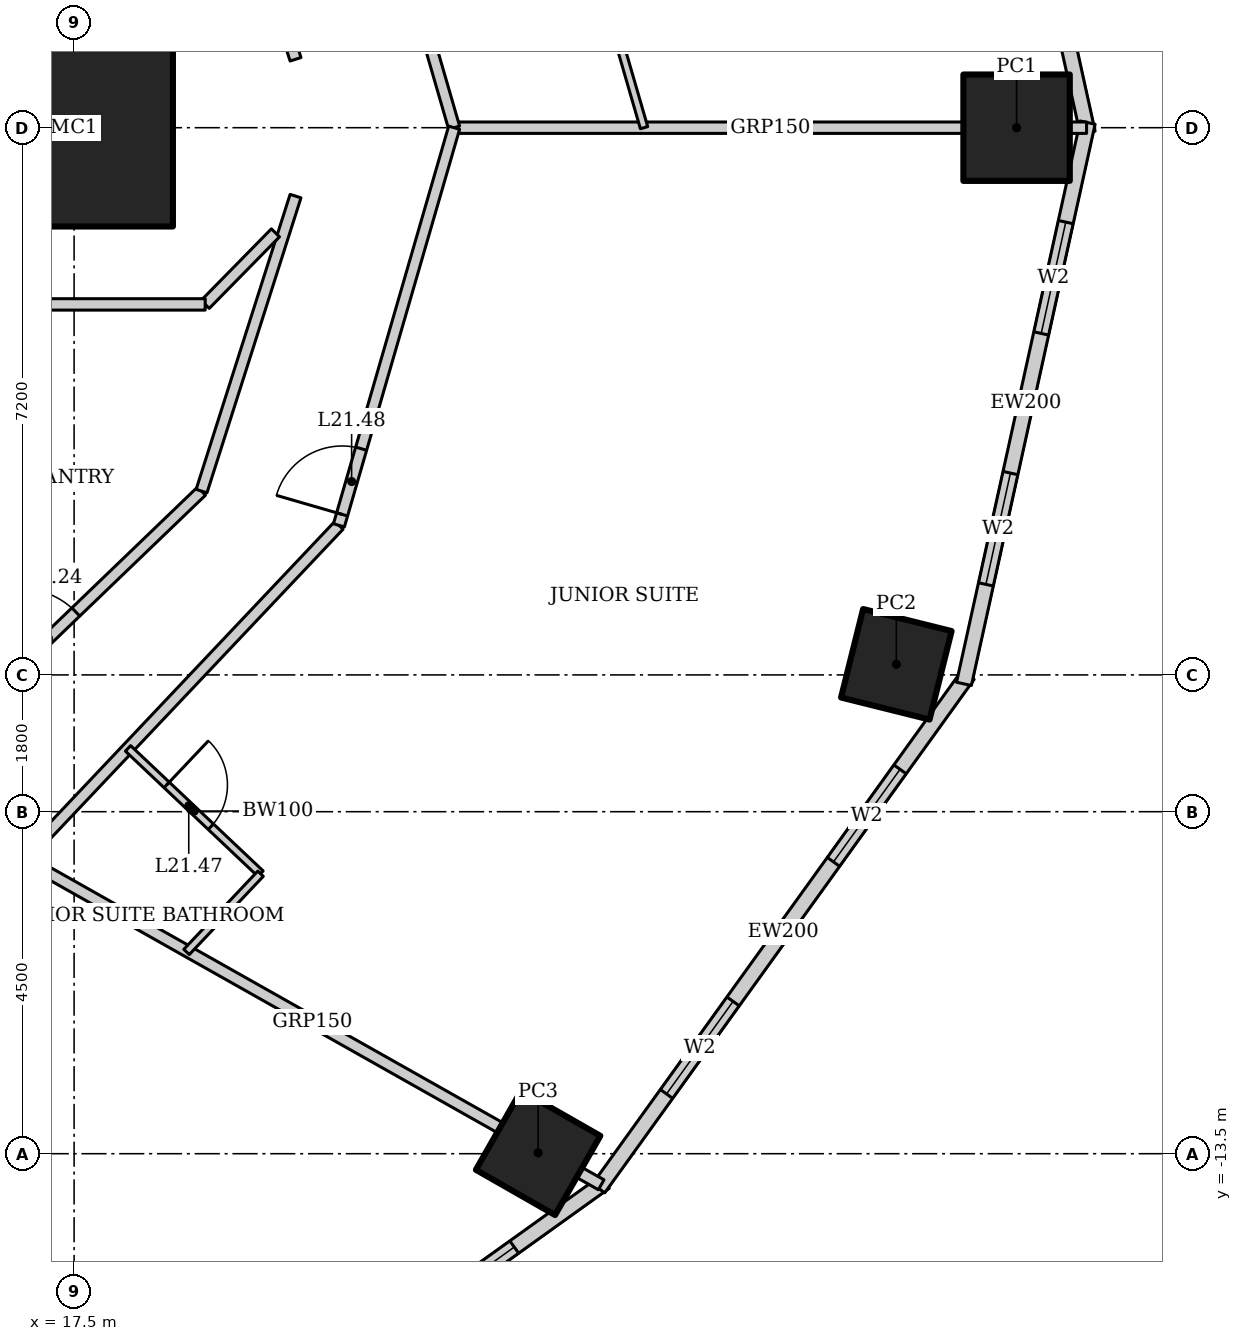
"""IFC4 building model, lengths in metres.
Left out: names, types, materials, properties, quantities, classifications, styles, units other than length and angle.
Written with IfcOpenShell. Run it as: python <this file> out.ifc"""

import sys

from ifc_helpers import new_model, si_unit, direction, frame, frame_2d, origin, origin_2d, place, context, subcontext, project, spatial, rectangle, hollow_rectangle, extrude, element, fill, save


model = new_model("IFC4")
c1 = context("Model", 3, precision=1e-05, world=origin(), true_north=direction((0.0, 1.0)))
c2 = subcontext(c1, "Body", "Model", "MODEL_VIEW")
j1 = project(units=[si_unit("LENGTHUNIT", "METRE"), si_unit("PLANEANGLEUNIT", "RADIAN")], contexts=[c1])
p1 = place(None, origin())
s1 = spatial("IfcSite", under=j1, at=p1, CompositionType="ELEMENT")
p2 = place(p1, origin())
s2 = spatial("IfcBuilding", under=s1, at=p2, CompositionType="ELEMENT")
p3 = place(p2, frame((0.0, 0.0, 91.0)))
s3 = spatial("IfcBuildingStorey", under=s2, at=p3, CompositionType="ELEMENT", Elevation=91.0)
p4 = place(p3, frame((17.5, 0.0, 0.0), z_axis=(0.0, 0.0, 1.0), x_axis=(1.0, 0.0, 0.0)))
e1 = element("IfcColumn", 1, at=p4, inside=s3, PredefinedType="COLUMN", context=c2, shape_type="SweptSolid", body=[
    extrude(hollow_rectangle(XDim=2.6, YDim=2.6, WallThickness=0.13, at=origin_2d()), origin(), (0.0, 0.0, 1.0), 3.6),
])
p5 = place(p3, frame((29.9, 0.0, 0.0), z_axis=(0.0, 0.0, 1.0), x_axis=(1.0, 0.0, 0.0)))
e2 = element("IfcColumn", 2, at=p5, inside=s3, PredefinedType="COLUMN", context=c2, shape_type="SweptSolid", body=[
    extrude(hollow_rectangle(XDim=1.4, YDim=1.4, WallThickness=0.1, at=origin_2d()), origin(), (0.0, 0.0, 1.0), 3.6),
])
p6 = place(p3, frame((23.605, -13.489, 0.0), z_axis=(0.0, 0.0, 1.0), x_axis=(0.496139221777, 0.86824298017, 0.0)))
e3 = element("IfcColumn", 3, at=p6, inside=s3, PredefinedType="COLUMN", context=c2, shape_type="SweptSolid", body=[
    extrude(hollow_rectangle(XDim=1.2, YDim=1.2, WallThickness=0.12, at=origin_2d()), origin(), (0.0, 0.0, 1.0), 3.6),
])
p7 = place(p3, frame((28.318, -7.06, 0.0), z_axis=(0.0, 0.0, 1.0), x_axis=(0.2419218956, 0.970295726276, 0.0)))
e4 = element("IfcColumn", 4, at=p7, inside=s3, PredefinedType="COLUMN", context=c2, shape_type="SweptSolid", body=[
    extrude(hollow_rectangle(XDim=1.2, YDim=1.2, WallThickness=0.1, at=origin_2d()), origin(), (0.0, 0.0, 1.0), 3.6),
])
p8 = place(p3, frame((30.835, -0.067, 0.0), z_axis=(0.0, 0.0, 1.0), x_axis=(-0.215238065514, 0.976561608478, 0.0)))
e5 = element("IfcWall", 5, at=p8, inside=s3, PredefinedType="SOLIDWALL", context=c2, shape_type="SweptSolid", body=[
    extrude(rectangle(XDim=7.562, YDim=0.2, at=frame_2d((3.781, 0.0))), origin(), (0.0, 0.0, 1.0), 3.45),
])
p9 = place(p8, frame((1.341, 0.0, 0.5)))
e6 = element("IfcOpeningElement", 6, at=p9, cuts=e5, PredefinedType="OPENING", context=c2, shape_type="SweptSolid", body=[
    extrude(rectangle(XDim=1.5, YDim=2.2, at=frame_2d((0.75, 1.1))), frame((0.0, 0.11, 0.0), z_axis=(0.0, -1.0, 0.0), x_axis=(1.0, 0.0, 0.0)), (0.0, 0.0, 1.0), 0.22),
])
p10 = place(p8, frame((4.722, 0.0, 0.5)))
e7 = element("IfcOpeningElement", 7, at=p10, cuts=e5, PredefinedType="OPENING", context=c2, shape_type="SweptSolid", body=[
    extrude(rectangle(XDim=1.5, YDim=2.2, at=frame_2d((0.75, 1.1))), frame((0.0, 0.11, 0.0), z_axis=(0.0, -1.0, 0.0), x_axis=(1.0, 0.0, 0.0)), (0.0, 0.0, 1.0), 0.22),
])
p11 = place(p3, frame((17.929, -18.572, 0.0), z_axis=(0.0, 0.0, 1.0), x_axis=(0.812791321576, 0.582554948112, 0.0)))
e8 = element("IfcWall", 8, at=p11, inside=s3, PredefinedType="SOLIDWALL", context=c2, shape_type="SweptSolid", body=[
    extrude(rectangle(XDim=8.063, YDim=0.2, at=frame_2d((4.032, 0.0))), origin(), (0.0, 0.0, 1.0), 3.45),
])
p12 = place(p11, frame((1.466, 0.0, 0.5)))
e9 = element("IfcOpeningElement", 9, at=p12, cuts=e8, PredefinedType="OPENING", context=c2, shape_type="SweptSolid", body=[
    extrude(rectangle(XDim=1.5, YDim=2.2, at=frame_2d((0.75, 1.1))), frame((0.0, 0.11, 0.0), z_axis=(0.0, -1.0, 0.0), x_axis=(1.0, 0.0, 0.0)), (0.0, 0.0, 1.0), 0.22),
])
p13 = place(p11, frame((5.097, 0.0, 0.5)))
e10 = element("IfcOpeningElement", 10, at=p13, cuts=e8, PredefinedType="OPENING", context=c2, shape_type="SweptSolid", body=[
    extrude(rectangle(XDim=1.5, YDim=2.2, at=frame_2d((0.75, 1.1))), frame((0.0, 0.11, 0.0), z_axis=(0.0, -1.0, 0.0), x_axis=(1.0, 0.0, 0.0)), (0.0, 0.0, 1.0), 0.22),
])
p14 = place(p3, frame((24.4, -13.957, 0.0), z_axis=(0.0, 0.0, 1.0), x_axis=(0.583937613703, 0.811798536155, 0.0)))
e11 = element("IfcWall", 11, at=p14, inside=s3, PredefinedType="SOLIDWALL", context=c2, shape_type="SweptSolid", body=[
    extrude(rectangle(XDim=8.323, YDim=0.2, at=frame_2d((4.162, 0.0))), origin(), (0.0, 0.0, 1.0), 3.45),
])
p15 = place(p14, frame((1.531, 0.0, 0.5)))
e12 = element("IfcOpeningElement", 12, at=p15, cuts=e11, PredefinedType="OPENING", context=c2, shape_type="SweptSolid", body=[
    extrude(rectangle(XDim=1.5, YDim=2.2, at=frame_2d((0.75, 1.1))), frame((0.0, 0.11, 0.0), z_axis=(0.0, -1.0, 0.0), x_axis=(1.0, 0.0, 0.0)), (0.0, 0.0, 1.0), 0.22),
])
p16 = place(p14, frame((5.292, 0.0, 0.5)))
e13 = element("IfcOpeningElement", 13, at=p16, cuts=e11, PredefinedType="OPENING", context=c2, shape_type="SweptSolid", body=[
    extrude(rectangle(XDim=1.5, YDim=2.2, at=frame_2d((0.75, 1.1))), frame((0.0, 0.11, 0.0), z_axis=(0.0, -1.0, 0.0), x_axis=(1.0, 0.0, 0.0)), (0.0, 0.0, 1.0), 0.22),
])
p17 = place(p3, frame((29.208, -7.318, 0.0), z_axis=(0.0, 0.0, 1.0), x_axis=(0.215238065514, 0.976561608478, 0.0)))
e14 = element("IfcWall", 14, at=p17, inside=s3, PredefinedType="SOLIDWALL", context=c2, shape_type="SweptSolid", body=[
    extrude(rectangle(XDim=7.562, YDim=0.2, at=frame_2d((3.781, 0.0))), origin(), (0.0, 0.0, 1.0), 3.45),
])
p18 = place(p17, frame((1.341, 0.0, 0.5)))
e15 = element("IfcOpeningElement", 15, at=p18, cuts=e14, PredefinedType="OPENING", context=c2, shape_type="SweptSolid", body=[
    extrude(rectangle(XDim=1.5, YDim=2.2, at=frame_2d((0.75, 1.1))), frame((0.0, 0.11, 0.0), z_axis=(0.0, -1.0, 0.0), x_axis=(1.0, 0.0, 0.0)), (0.0, 0.0, 1.0), 0.22),
])
p19 = place(p17, frame((4.722, 0.0, 0.5)))
e16 = element("IfcOpeningElement", 16, at=p19, cuts=e14, PredefinedType="OPENING", context=c2, shape_type="SweptSolid", body=[
    extrude(rectangle(XDim=1.5, YDim=2.2, at=frame_2d((0.75, 1.1))), frame((0.0, 0.11, 0.0), z_axis=(0.0, -1.0, 0.0), x_axis=(1.0, 0.0, 0.0)), (0.0, 0.0, 1.0), 0.22),
])
p20 = place(p3, frame((30.821, 0.0, 0.0), z_axis=(0.0, 0.0, 1.0), x_axis=(-1.0, 0.0, 0.0)))
e17 = element("IfcWall", 17, at=p20, inside=s3, PredefinedType="PARTITIONING", context=c2, shape_type="SweptSolid", body=[
    extrude(rectangle(XDim=8.321, YDim=0.15, at=frame_2d((4.16, 0.0))), origin(), (0.0, 0.0, 1.0), 2.528),
])
p21 = place(p3, frame((24.435, -13.909, 0.0), z_axis=(0.0, 0.0, 1.0), x_axis=(-0.87090601027, 0.491449612143, 0.0)))
e18 = element("IfcWall", 18, at=p21, inside=s3, PredefinedType="PARTITIONING", context=c2, shape_type="SweptSolid", body=[
    extrude(rectangle(XDim=8.726, YDim=0.15, at=frame_2d((4.363, 0.0))), origin(), (0.0, 0.0, 1.0), 2.693),
])
p22 = place(p3, frame((22.5, 0.0, 0.0), z_axis=(0.0, 0.0, 1.0), x_axis=(-0.278247435376, 0.960509429785, 0.0)))
e19 = element("IfcWall", 19, at=p22, inside=s3, PredefinedType="PARTITIONING", context=c2, shape_type="SweptSolid", body=[
    extrude(rectangle(XDim=5.447, YDim=0.15, at=frame_2d((2.724, 0.0))), origin(), (0.0, 0.0, 1.0), 3.45),
])
p23 = place(p3, frame((16.835, -9.62, 0.0), z_axis=(0.0, 0.0, 1.0), x_axis=(0.687062608696, 0.726598218916, 0.0)))
e20 = element("IfcWall", 20, at=p23, inside=s3, PredefinedType="PARTITIONING", context=c2, shape_type="SweptSolid", body=[
    extrude(rectangle(XDim=6.039, YDim=0.15, at=frame_2d((3.02, 0.0))), origin(), (0.0, 0.0, 1.0), 3.45),
])
p24 = place(p3, frame((20.984, -5.232, 0.0), z_axis=(0.0, 0.0, 1.0), x_axis=(0.278247435376, 0.960509429785, 0.0)))
e21 = element("IfcWall", 21, at=p24, inside=s3, PredefinedType="PARTITIONING", context=c2, shape_type="SweptSolid", body=[
    extrude(rectangle(XDim=5.447, YDim=0.15, at=frame_2d((2.724, 0.0))), origin(), (0.0, 0.0, 1.0), 3.45),
])
p25 = place(p24, frame((0.15, 0.0, 0.0)))
e22 = element("IfcOpeningElement", 22, at=p25, cuts=e21, PredefinedType="OPENING", context=c2, shape_type="SweptSolid", body=[
    extrude(rectangle(XDim=0.9, YDim=2.1, at=frame_2d((0.45, 1.05))), frame((0.0, 0.085, 0.0), z_axis=(0.0, -1.0, 0.0), x_axis=(1.0, 0.0, 0.0)), (0.0, 0.0, 1.0), 0.17),
])
p26 = place(p3, frame((20.413, 0.9, 0.0), z_axis=(0.0, 0.0, 1.0), x_axis=(-0.303505448228, 0.952829702988, 0.0)))
e23 = element("IfcWall", 23, at=p26, inside=s3, PredefinedType="PARTITIONING", context=c2, shape_type="SweptSolid", body=[
    extrude(rectangle(XDim=4.073, YDim=0.15, at=frame_2d((2.037, 0.0))), origin(), (0.0, 0.0, 1.0), 3.45),
])
p27 = place(p3, frame((15.147, -8.656, 0.0), z_axis=(0.0, 0.0, 1.0), x_axis=(0.720837261072, 0.693104352209, 0.0)))
e24 = element("IfcWall", 24, at=p27, inside=s3, PredefinedType="PARTITIONING", context=c2, shape_type="SweptSolid", body=[
    extrude(rectangle(XDim=5.59, YDim=0.15, at=frame_2d((2.795, 0.0))), origin(), (0.0, 0.0, 1.0), 3.45),
])
p28 = place(p27, frame((2.295, 0.0, 0.0)))
e25 = element("IfcOpeningElement", 25, at=p28, cuts=e24, PredefinedType="OPENING", context=c2, shape_type="SweptSolid", body=[
    extrude(rectangle(XDim=1.0, YDim=2.1, at=frame_2d((0.5, 1.05))), frame((0.0, 0.085, 0.0), z_axis=(0.0, -1.0, 0.0), x_axis=(1.0, 0.0, 0.0)), (0.0, 0.0, 1.0), 0.17),
])
p29 = place(p3, frame((19.177, -4.781, 0.0), z_axis=(0.0, 0.0, 1.0), x_axis=(0.303505448228, 0.952829702988, 0.0)))
e26 = element("IfcWall", 26, at=p29, inside=s3, PredefinedType="PARTITIONING", context=c2, shape_type="SweptSolid", body=[
    extrude(rectangle(XDim=4.073, YDim=0.15, at=frame_2d((2.037, 0.0))), origin(), (0.0, 0.0, 1.0), 3.45),
])
p30 = place(p3, frame((24.249, 2.589, 0.0), z_axis=(0.0, 0.0, 1.0), x_axis=(0.278260412958, -0.960505670249, 0.0)))
e27 = element("IfcWall", 27, at=p30, inside=s3, PredefinedType="PARTITIONING", context=c2, shape_type="SweptSolid", body=[
    extrude(rectangle(XDim=2.695, YDim=0.1, at=frame_2d((1.348, 0.0))), origin(), (0.0, 0.0, 1.0), 3.45),
])
p31 = place(p3, frame((18.209, -8.167, 0.0), z_axis=(0.0, 0.0, 1.0), x_axis=(0.726567238928, -0.687095369885, 0.0)))
e28 = element("IfcWall", 28, at=p31, inside=s3, PredefinedType="PARTITIONING", context=c2, shape_type="SweptSolid", body=[
    extrude(rectangle(XDim=2.4, YDim=0.1, at=frame_2d((1.2, 0.0))), origin(), (0.0, 0.0, 1.0), 3.45),
])
p32 = place(p31, frame((0.7, 0.0, 0.0)))
e29 = element("IfcOpeningElement", 29, at=p32, cuts=e28, PredefinedType="OPENING", context=c2, shape_type="SweptSolid", body=[
    extrude(rectangle(XDim=0.8, YDim=2.1, at=frame_2d((0.4, 1.05))), frame((0.0, 0.06, 0.0), z_axis=(0.0, -1.0, 0.0), x_axis=(1.0, 0.0, 0.0)), (0.0, 0.0, 1.0), 0.12),
])
p33 = place(p3, frame((19.953, -9.816, 0.0), z_axis=(0.0, 0.0, 1.0), x_axis=(-0.687017997787, -0.726640399866, 0.0)))
e30 = element("IfcWall", 30, at=p33, inside=s3, PredefinedType="PARTITIONING", context=c2, shape_type="SweptSolid", body=[
    extrude(rectangle(XDim=1.417, YDim=0.1, at=frame_2d((0.708, 0.0))), origin(), (0.0, 0.0, 1.0), 3.45),
])
p34 = place(p3, frame((20.149, -1.384, 0.0), z_axis=(0.0, 0.0, 1.0), x_axis=(-0.700694560486, -0.713461374501, 0.0)))
e31 = element("IfcWall", 31, at=p34, inside=s3, PredefinedType="PARTITIONING", context=c2, shape_type="SweptSolid", body=[
    extrude(rectangle(XDim=1.32, YDim=0.15, at=frame_2d((0.66, 0.0))), origin(), (0.0, 0.0, 1.0), 3.45),
])
p35 = place(p3, frame((19.225, -2.325, 0.0), z_axis=(0.0, 0.0, 1.0), x_axis=(-1.0, 0.0, 0.0)))
e32 = element("IfcWall", 32, at=p35, inside=s3, PredefinedType="PARTITIONING", context=c2, shape_type="SweptSolid", body=[
    extrude(rectangle(XDim=3.449, YDim=0.15, at=frame_2d((1.725, 0.0))), origin(), (0.0, 0.0, 1.0), 3.45),
])
p36 = place(p13, origin())
e33 = element("IfcWindow", 33, at=p36, inside=s3, PartitioningType="SINGLE_PANEL", PredefinedType="WINDOW", context=c2, shape_type="SweptSolid", body=[
    extrude(rectangle(XDim=1.5, YDim=2.2, at=frame_2d((0.75, 1.1))), frame((0.0, 0.03, 0.0), z_axis=(0.0, -1.0, 0.0), x_axis=(1.0, 0.0, 0.0)), (0.0, 0.0, 1.0), 0.06),
])
fill(e10, e33)
p37 = place(p15, origin())
e34 = element("IfcWindow", 34, at=p37, inside=s3, PartitioningType="SINGLE_PANEL", PredefinedType="WINDOW", context=c2, shape_type="SweptSolid", body=[
    extrude(rectangle(XDim=1.5, YDim=2.2, at=frame_2d((0.75, 1.1))), frame((0.0, 0.03, 0.0), z_axis=(0.0, -1.0, 0.0), x_axis=(1.0, 0.0, 0.0)), (0.0, 0.0, 1.0), 0.06),
])
fill(e12, e34)
p38 = place(p16, origin())
e35 = element("IfcWindow", 35, at=p38, inside=s3, PartitioningType="SINGLE_PANEL", PredefinedType="WINDOW", context=c2, shape_type="SweptSolid", body=[
    extrude(rectangle(XDim=1.5, YDim=2.2, at=frame_2d((0.75, 1.1))), frame((0.0, 0.03, 0.0), z_axis=(0.0, -1.0, 0.0), x_axis=(1.0, 0.0, 0.0)), (0.0, 0.0, 1.0), 0.06),
])
fill(e13, e35)
p39 = place(p18, origin())
e36 = element("IfcWindow", 36, at=p39, inside=s3, PartitioningType="SINGLE_PANEL", PredefinedType="WINDOW", context=c2, shape_type="SweptSolid", body=[
    extrude(rectangle(XDim=1.5, YDim=2.2, at=frame_2d((0.75, 1.1))), frame((0.0, 0.03, 0.0), z_axis=(0.0, -1.0, 0.0), x_axis=(1.0, 0.0, 0.0)), (0.0, 0.0, 1.0), 0.06),
])
fill(e15, e36)
p40 = place(p19, origin())
e37 = element("IfcWindow", 37, at=p40, inside=s3, PartitioningType="SINGLE_PANEL", PredefinedType="WINDOW", context=c2, shape_type="SweptSolid", body=[
    extrude(rectangle(XDim=1.5, YDim=2.2, at=frame_2d((0.75, 1.1))), frame((0.0, 0.03, 0.0), z_axis=(0.0, -1.0, 0.0), x_axis=(1.0, 0.0, 0.0)), (0.0, 0.0, 1.0), 0.06),
])
fill(e16, e37)
p41 = place(p28, origin())
e38 = element("IfcDoor", 38, at=p41, inside=s3, OperationType="SINGLE_SWING_LEFT", PredefinedType="DOOR", context=c2, shape_type="SweptSolid", body=[
    extrude(rectangle(XDim=1.0, YDim=2.1, at=frame_2d((0.5, 1.05))), frame((0.0, 0.025, 0.0), z_axis=(0.0, -1.0, 0.0), x_axis=(1.0, 0.0, 0.0)), (0.0, 0.0, 1.0), 0.05),
])
fill(e25, e38)
p42 = place(p32, origin())
e39 = element("IfcDoor", 39, at=p42, inside=s3, OperationType="SINGLE_SWING_LEFT", PredefinedType="DOOR", context=c2, shape_type="SweptSolid", body=[
    extrude(rectangle(XDim=0.8, YDim=2.1, at=frame_2d((0.4, 1.05))), frame((0.0, 0.025, 0.0), z_axis=(0.0, -1.0, 0.0), x_axis=(1.0, 0.0, 0.0)), (0.0, 0.0, 1.0), 0.05),
])
fill(e29, e39)
p43 = place(p25, origin())
e40 = element("IfcDoor", 40, at=p43, inside=s3, OperationType="SINGLE_SWING_LEFT", PredefinedType="DOOR", context=c2, shape_type="SweptSolid", body=[
    extrude(rectangle(XDim=0.9, YDim=2.1, at=frame_2d((0.45, 1.05))), frame((0.0, 0.025, 0.0), z_axis=(0.0, -1.0, 0.0), x_axis=(1.0, 0.0, 0.0)), (0.0, 0.0, 1.0), 0.05),
])
fill(e22, e40)
save(model, sys.argv[1])
